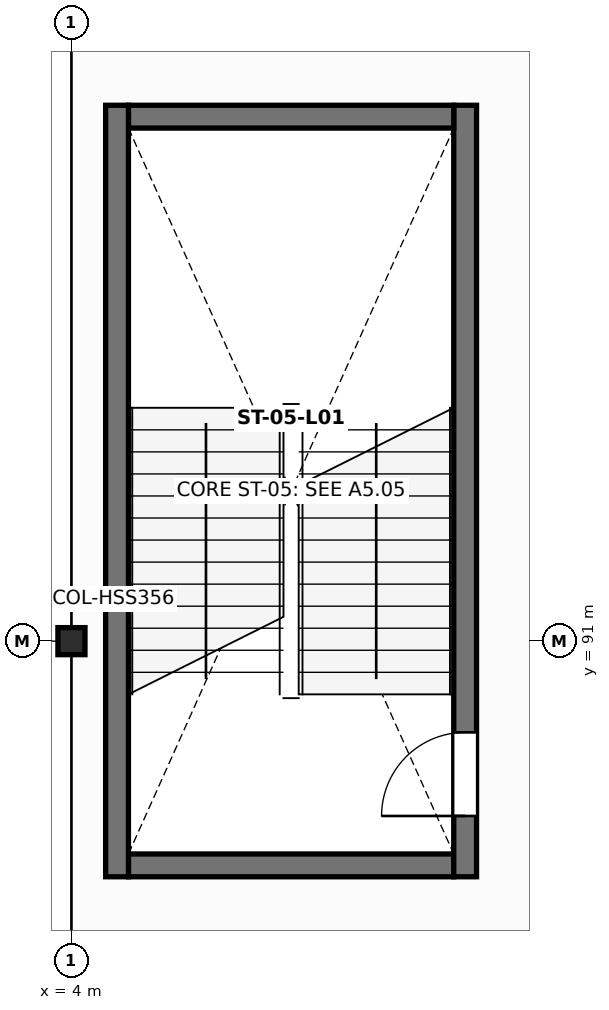
"""IFC4 building model, lengths in metres.
Left out: names, types, materials, properties, quantities, classifications, styles, units other than length and angle.
Written with IfcOpenShell. Run it as: python <this file> out.ifc"""

import sys

from ifc_helpers import new_model, si_unit, direction, frame, frame_2d, origin, origin_2d, place, context, subcontext, project, spatial, rectangle, hollow_rectangle, extrude, element, fill, save


model = new_model("IFC4")
c1 = context("Model", 3, precision=1e-05, world=origin(), true_north=direction((0.0, 1.0)))
c2 = subcontext(c1, "Body", "Model", "MODEL_VIEW")
j1 = project(units=[si_unit("LENGTHUNIT", "METRE"), si_unit("PLANEANGLEUNIT", "RADIAN")], contexts=[c1])
p1 = place(None, origin())
s1 = spatial("IfcSite", under=j1, at=p1, CompositionType="ELEMENT")
p2 = place(p1, origin())
s2 = spatial("IfcBuilding", under=s1, at=p2, CompositionType="ELEMENT")
p3 = place(p2, frame((0.0, 0.0, 6.0)))
s3 = spatial("IfcBuildingStorey", under=s2, at=p3, CompositionType="ELEMENT", Elevation=6.0)
p4 = place(p3, frame((4.0, 91.0, 0.0), z_axis=(0.0, 0.0, 1.0), x_axis=(1.0, 0.0, 0.0)))
e1 = element("IfcColumn", 1, at=p4, inside=s3, PredefinedType="COLUMN", context=c2, shape_type="SweptSolid", body=[
    extrude(hollow_rectangle(XDim=0.356, YDim=0.356, WallThickness=0.015, at=origin_2d()), origin(), (0.0, 0.0, 1.0), 5.2),
])
p5 = place(p3, frame((4.75, 88.05, 0.0), z_axis=(0.0, 0.0, 1.0), x_axis=(1.0, 0.0, 0.0)))
e2 = element("IfcWall", 2, at=p5, inside=s3, PredefinedType="SHEAR", context=c2, shape_type="SweptSolid", body=[
    extrude(rectangle(XDim=4.28, YDim=0.3, at=frame_2d((2.14, 0.0))), origin(), (0.0, 0.0, 1.0), 4.945),
])
p6 = place(p3, frame((9.18, 87.9, 0.0), z_axis=(0.0, 0.0, 1.0), x_axis=(0.0, 1.0, 0.0)))
e3 = element("IfcWall", 3, at=p6, inside=s3, PredefinedType="SHEAR", context=c2, shape_type="SweptSolid", body=[
    extrude(rectangle(XDim=10.15, YDim=0.3, at=frame_2d((5.075, 0.0))), origin(), (0.0, 0.0, 1.0), 4.945),
])
p7 = place(p6, frame((0.8, 0.0, 0.0)))
e4 = element("IfcOpeningElement", 4, at=p7, cuts=e3, PredefinedType="OPENING", context=c2, shape_type="SweptSolid", body=[
    extrude(rectangle(XDim=1.1, YDim=2.15, at=frame_2d((0.55, 1.075))), frame((0.0, 0.16, 0.0), z_axis=(0.0, -1.0, 0.0), x_axis=(1.0, 0.0, 0.0)), (0.0, 0.0, 1.0), 0.32),
])
p8 = place(p3, frame((9.03, 97.9, 0.0), z_axis=(0.0, 0.0, 1.0), x_axis=(-1.0, 0.0, 0.0)))
e5 = element("IfcWall", 5, at=p8, inside=s3, PredefinedType="SHEAR", context=c2, shape_type="SweptSolid", body=[
    extrude(rectangle(XDim=4.28, YDim=0.3, at=frame_2d((2.14, 0.0))), origin(), (0.0, 0.0, 1.0), 4.945),
])
p9 = place(p3, frame((4.6, 98.05, 0.0), z_axis=(0.0, 0.0, 1.0), x_axis=(0.0, -1.0, 0.0)))
e6 = element("IfcWall", 6, at=p9, inside=s3, PredefinedType="SHEAR", context=c2, shape_type="SweptSolid", body=[
    extrude(rectangle(XDim=10.15, YDim=0.3, at=frame_2d((5.075, 0.0))), origin(), (0.0, 0.0, 1.0), 4.945),
])
p10 = place(p7, origin())
e7 = element("IfcDoor", 7, at=p10, inside=s3, OperationType="SINGLE_SWING_LEFT", PredefinedType="DOOR", context=c2, shape_type="SweptSolid", body=[
    extrude(rectangle(XDim=1.1, YDim=2.15, at=frame_2d((0.55, 1.075))), frame((0.0, 0.025, 0.0), z_axis=(0.0, -1.0, 0.0), x_axis=(1.0, 0.0, 0.0)), (0.0, 0.0, 1.0), 0.05),
])
fill(e4, e7)
save(model, sys.argv[1])
